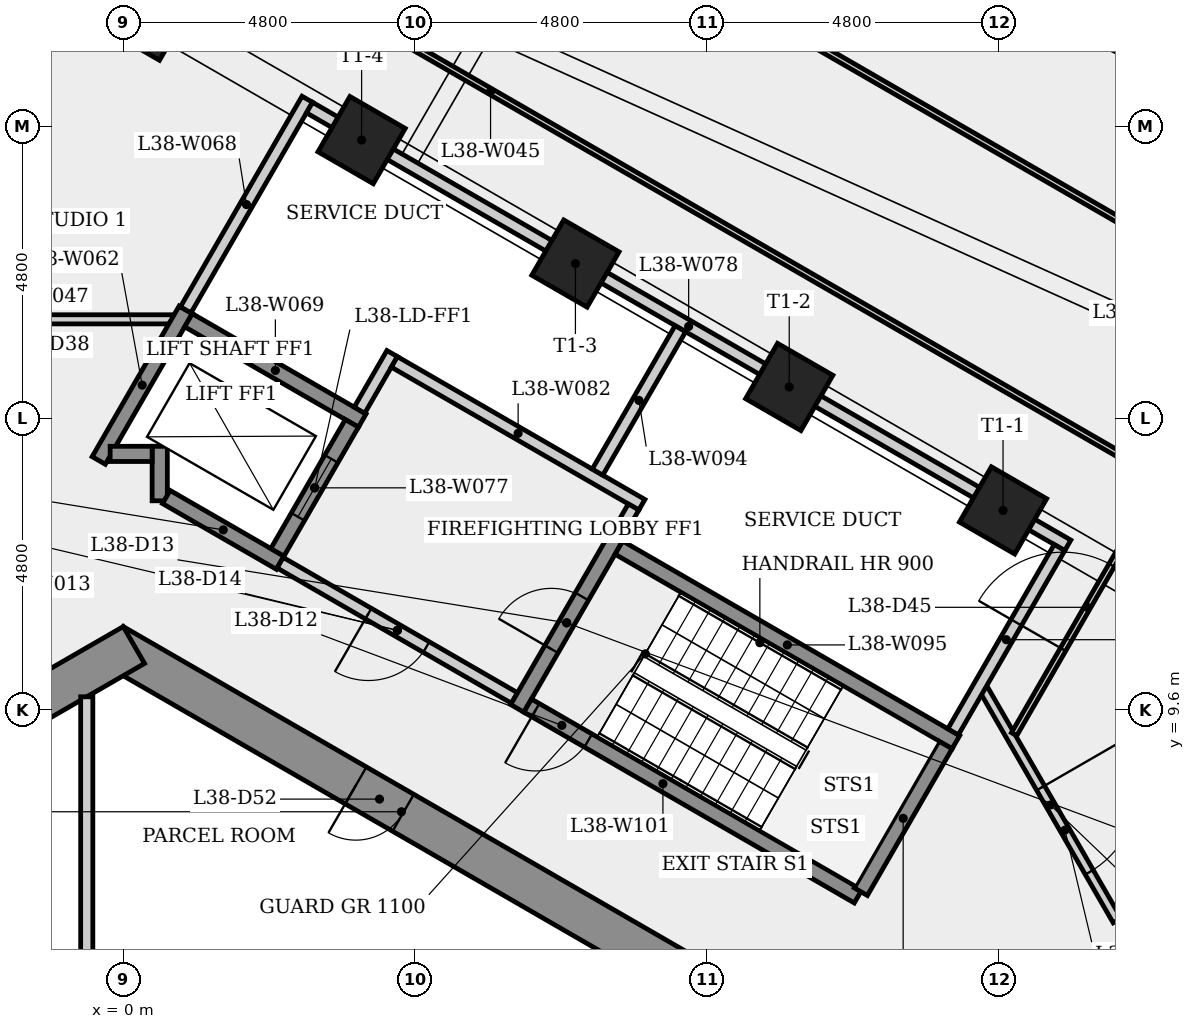
"""IFC4 building model, lengths in metres.
Left out: names, types, materials, properties, quantities, classifications, styles, units other than length and angle.
Written with IfcOpenShell. Run it as: python <this file> out.ifc"""

import sys

from ifc_helpers import new_model, si_unit, direction, frame, frame_2d, origin, origin_2d, place, context, subcontext, project, spatial, rectangle, extrude, element, fill, save


model = new_model("IFC4")
c1 = context("Model", 3, precision=1e-05, world=origin(), true_north=direction((0.0, 1.0)))
c2 = subcontext(c1, "Body", "Model", "MODEL_VIEW")
j1 = project(units=[si_unit("LENGTHUNIT", "METRE"), si_unit("PLANEANGLEUNIT", "RADIAN")], contexts=[c1])
p1 = place(None, origin())
s1 = spatial("IfcSite", under=j1, at=p1, CompositionType="ELEMENT")
p2 = place(p1, origin())
s2 = spatial("IfcBuilding", under=s1, at=p2, CompositionType="ELEMENT")
p3 = place(p2, frame((0.0, 0.0, 143.9)))
s3 = spatial("IfcBuildingStorey", under=s2, at=p3, CompositionType="ELEMENT", Elevation=143.9)
p4 = place(p3, frame((9.325, 5.182, 0.0), z_axis=(0.0, 0.0, 1.0), x_axis=(-0.866023993627, 0.500002442456, 0.0)))
e1 = element("IfcWall", 1, at=p4, inside=s3, PredefinedType="SHEAR", context=c2, shape_type="SweptSolid", body=[
    extrude(rectangle(XDim=10.97, YDim=0.7, at=frame_2d((5.485, 0.0))), origin(), (0.0, 0.0, 1.0), 4.0),
])
p5 = place(p4, frame((5.451, 0.0, 0.0)))
e2 = element("IfcOpeningElement", 2, at=p5, cuts=e1, PredefinedType="OPENING", context=c2, shape_type="SweptSolid", body=[
    extrude(rectangle(XDim=0.9, YDim=2.1, at=frame_2d((0.45, 1.05))), frame((0.0, 0.36, 0.0), z_axis=(0.0, -1.0, 0.0), x_axis=(1.0, 0.0, 0.0)), (0.0, 0.0, 1.0), 0.72),
])
p6 = place(p3, frame((0.175, 10.667, 0.0), z_axis=(0.0, 0.0, 1.0), x_axis=(-0.866023993627, -0.500002442456, 0.0)))
e3 = element("IfcWall", 3, at=p6, inside=s3, PredefinedType="SHEAR", context=c2, shape_type="SweptSolid", body=[
    extrude(rectangle(XDim=10.97, YDim=0.7, at=frame_2d((5.485, 0.0))), origin(), (0.0, 0.0, 1.0), 4.0),
])
p7 = place(p6, frame((7.021, 0.0, 0.0)))
e4 = element("IfcOpeningElement", 4, at=p7, cuts=e3, PredefinedType="OPENING", context=c2, shape_type="SweptSolid", body=[
    extrude(rectangle(XDim=0.9, YDim=2.1, at=frame_2d((0.45, 1.05))), frame((0.0, 0.36, 0.0), z_axis=(0.0, -1.0, 0.0), x_axis=(1.0, 0.0, 0.0)), (0.0, 0.0, 1.0), 0.72),
])
for number, where, z_axis, x_axis in (
    (5, (14.469, 12.88, 0.0), (0.0, 0.0, 1.0), (0.5, 0.866, 0.0)),
    (6, (10.953, 14.911, 0.0), (0.0, 0.0, 1.0), (0.5, 0.866, 0.0)),
    (7, (7.437, 16.941, 0.0), (0.0, 0.0, 1.0), (0.5, 0.866, 0.0)),
    (8, (3.92, 18.971, 0.0), (0.0, 0.0, 1.0), (0.5, 0.866, 0.0)),
    (9, (0.404, 21.001, 0.0), (0.0, 0.0, 1.0), (0.5, 0.866, 0.0)),
):
    element("IfcColumn", number, at=place(p3, frame(where, z_axis=z_axis, x_axis=x_axis)), inside=s3, PredefinedType="COLUMN", context=c2, shape_type="SweptSolid", body=[
        extrude(rectangle(XDim=1.05, YDim=1.05, at=origin_2d()), origin(), (0.0, 0.0, 1.0), 4.0),
    ])
p8 = place(p3, frame((-4.951, 26.117, 0.0), z_axis=(0.0, 0.0, 1.0), x_axis=(0.866023342268, -0.500003570635, 0.0)))
e10 = element("IfcWall", 10, at=p8, inside=s3, PredefinedType="PARTITIONING", context=c2, shape_type="SweptSolid", body=[
    extrude(rectangle(XDim=25.385, YDim=0.1, at=frame_2d((12.692, 0.0))), origin(), (0.0, 0.0, 1.0), 3.6),
])
p9 = place(p3, frame((-3.581, 16.023, 0.0), z_axis=(0.0, 0.0, 1.0), x_axis=(1.0, 0.0, 0.0)))
e11 = element("IfcWall", 11, at=p9, inside=s3, PredefinedType="PARTITIONING", context=c2, shape_type="SweptSolid", body=[
    extrude(rectangle(XDim=4.393, YDim=0.15, at=frame_2d((2.196, 0.0))), origin(), (0.0, 0.0, 1.0), 3.6),
])
for number, where, z_axis, x_axis in (
    (12, (-3.283, 29.005, 0.0), (0.0, 0.0, 1.0), (0.866, -0.5, 0.0)),
    (13, (-1.615, 31.894, 0.0), (0.0, 0.0, 1.0), (0.866, -0.5, 0.0)),
):
    element("IfcWall", number, at=place(p3, frame(where, z_axis=z_axis, x_axis=x_axis)), inside=s3, PredefinedType="PARTITIONING", context=c2, shape_type="SweptSolid", body=[
        extrude(rectangle(XDim=25.385, YDim=0.1, at=frame_2d((12.692, 0.0))), origin(), (0.0, 0.0, 1.0), 3.6),
    ])
p10 = place(p3, frame((-0.6, 9.815, 0.0), z_axis=(0.0, 0.0, 1.0), x_axis=(0.0, -1.0, 0.0)))
e14 = element("IfcWall", 14, at=p10, inside=s3, PredefinedType="PARTITIONING", context=c2, shape_type="SweptSolid", body=[
    extrude(rectangle(XDim=4.54, YDim=0.2, at=frame_2d((2.27, 0.0))), origin(), (0.0, 0.0, 1.0), 3.6),
])
p11 = place(p3, frame((-0.403, 13.702, 0.0), z_axis=(0.0, 0.0, 1.0), x_axis=(0.499976111731, 0.866039195244, 0.0)))
e15 = element("IfcWall", 15, at=p11, inside=s3, PredefinedType="SHEAR", context=c2, shape_type="SweptSolid", body=[
    extrude(rectangle(XDim=2.861, YDim=0.25, at=frame_2d((1.43, 0.0))), origin(), (0.0, 0.0, 1.0), 3.6),
])
p12 = place(p3, frame((0.6, 13.039, 0.0), z_axis=(0.0, 0.0, 1.0), x_axis=(0.0, 1.0, 0.0)))
e16 = element("IfcWall", 16, at=p12, inside=s3, PredefinedType="SHEAR", context=c2, shape_type="SweptSolid", body=[
    extrude(rectangle(XDim=0.896, YDim=0.25, at=frame_2d((0.448, 0.0))), origin(), (0.0, 0.0, 1.0), 3.6),
])
p13 = place(p3, frame((0.475, 13.81, 0.0), z_axis=(0.0, 0.0, 1.0), x_axis=(-1.0, 0.0, 0.0)))
e17 = element("IfcWall", 17, at=p13, inside=s3, PredefinedType="SHEAR", context=c2, shape_type="SweptSolid", body=[
    extrude(rectangle(XDim=0.691, YDim=0.25, at=frame_2d((0.345, 0.0))), origin(), (0.0, 0.0, 1.0), 4.0),
])
p14 = place(p3, frame((1.027, 16.179, 0.0), z_axis=(0.0, 0.0, 1.0), x_axis=(0.500006030964, 0.866021921778, 0.0)))
e18 = element("IfcWall", 18, at=p14, inside=s3, PredefinedType="PLUMBINGWALL", context=c2, shape_type="SweptSolid", body=[
    extrude(rectangle(XDim=4.0, YDim=0.2, at=frame_2d((2.0, 0.0))), origin(), (0.0, 0.0, 1.0), 3.6),
])
p15 = place(p3, frame((1.073, 16.008, 0.0), z_axis=(0.0, 0.0, 1.0), x_axis=(0.866040211805, -0.499974350878, 0.0)))
e19 = element("IfcWall", 19, at=p15, inside=s3, PredefinedType="SHEAR", context=c2, shape_type="SweptSolid", body=[
    extrude(rectangle(XDim=3.3, YDim=0.25, at=frame_2d((1.65, 0.0))), origin(), (0.0, 0.0, 1.0), 3.6),
])
p16 = place(p3, frame((2.581, 12.02, 0.0), z_axis=(0.0, 0.0, 1.0), x_axis=(-0.86603892542, 0.499976579108, 0.0)))
e20 = element("IfcWall", 20, at=p16, inside=s3, PredefinedType="SHEAR", context=c2, shape_type="SweptSolid", body=[
    extrude(rectangle(XDim=2.162, YDim=0.25, at=frame_2d((1.081, 0.0))), origin(), (0.0, 0.0, 1.0), 3.6),
])
p17 = place(p3, frame((2.535, 12.191, 0.0), z_axis=(0.0, 0.0, 1.0), x_axis=(0.500061746146, 0.865989751695, 0.0)))
e21 = element("IfcWall", 21, at=p17, inside=s3, PredefinedType="SHEAR", context=c2, shape_type="SweptSolid", body=[
    extrude(rectangle(XDim=2.45, YDim=0.25, at=frame_2d((1.225, 0.0))), origin(), (0.0, 0.0, 1.0), 4.0),
])
p18 = place(p17, frame((0.675, 0.0, 0.0)))
e22 = element("IfcOpeningElement", 22, at=p18, cuts=e21, PredefinedType="OPENING", context=c2, shape_type="SweptSolid", body=[
    extrude(rectangle(XDim=1.1, YDim=2.1, at=frame_2d((0.55, 1.05))), frame((0.0, 0.135, 0.0), z_axis=(0.0, -1.0, 0.0), x_axis=(1.0, 0.0, 0.0)), (0.0, 0.0, 1.0), 0.27),
])
p19 = place(p3, frame((3.063, 19.506, 0.0), z_axis=(0.0, 0.0, 1.0), x_axis=(0.866025783705, -0.499999341958, 0.0)))
e23 = element("IfcWall", 23, at=p19, inside=s3, PredefinedType="PLUMBINGWALL", context=c2, shape_type="SweptSolid", body=[
    extrude(rectangle(XDim=14.4, YDim=0.2, at=frame_2d((7.2, 0.0))), origin(), (0.0, 0.0, 1.0), 2.725),
])
p20 = place(p3, frame((3.885, 14.529, 0.0), z_axis=(0.0, 0.0, 1.0), x_axis=(0.499997628298, 0.866026773083, 0.0)))
e24 = element("IfcWall", 24, at=p20, inside=s3, PredefinedType="PLUMBINGWALL", context=c2, shape_type="SweptSolid", body=[
    extrude(rectangle(XDim=1.075, YDim=0.2, at=frame_2d((0.538, 0.0))), origin(), (0.0, 0.0, 1.0), 3.6),
])
p21 = place(p3, frame((4.459, 15.323, 0.0), z_axis=(0.0, 0.0, 1.0), x_axis=(0.866016039709, -0.500016218704, 0.0)))
e25 = element("IfcWall", 25, at=p21, inside=s3, PredefinedType="PLUMBINGWALL", context=c2, shape_type="SweptSolid", body=[
    extrude(rectangle(XDim=4.7, YDim=0.2, at=frame_2d((2.35, 0.0))), origin(), (0.0, 0.0, 1.0), 3.6),
])
p22 = place(p3, frame((6.435, 9.795, 0.0), z_axis=(0.0, 0.0, 1.0), x_axis=(-0.866012907634, 0.500021643343, 0.0)))
e26 = element("IfcWall", 26, at=p22, inside=s3, PredefinedType="PARTITIONING", context=c2, shape_type="SweptSolid", body=[
    extrude(rectangle(XDim=4.45, YDim=0.2, at=frame_2d((2.225, 0.0))), origin(), (0.0, 0.0, 1.0), 3.6),
])
p23 = place(p22, frame((1.675, 0.0, 0.0)))
e27 = element("IfcOpeningElement", 27, at=p23, cuts=e26, PredefinedType="OPENING", context=c2, shape_type="SweptSolid", body=[
    extrude(rectangle(XDim=1.1, YDim=2.1, at=frame_2d((0.55, 1.05))), frame((0.0, 0.11, 0.0), z_axis=(0.0, -1.0, 0.0), x_axis=(1.0, 0.0, 0.0)), (0.0, 0.0, 1.0), 0.22),
])
p24 = place(p3, frame((6.48, 9.624, 0.0), z_axis=(0.0, 0.0, 1.0), x_axis=(0.500017246033, 0.866015446554, 0.0)))
e28 = element("IfcWall", 28, at=p24, inside=s3, PredefinedType="SHEAR", context=c2, shape_type="SweptSolid", body=[
    extrude(rectangle(XDim=3.25, YDim=0.25, at=frame_2d((1.625, 0.0))), origin(), (0.0, 0.0, 1.0), 3.6),
])
p25 = place(p24, frame((1.125, 0.0, 0.0)))
e29 = element("IfcOpeningElement", 29, at=p25, cuts=e28, PredefinedType="OPENING", context=c2, shape_type="SweptSolid", body=[
    extrude(rectangle(XDim=1.0, YDim=2.1, at=frame_2d((0.5, 1.05))), frame((0.0, 0.135, 0.0), z_axis=(0.0, -1.0, 0.0), x_axis=(1.0, 0.0, 0.0)), (0.0, 0.0, 1.0), 0.27),
])
p26 = place(p3, frame((7.8, 13.51, 0.0), z_axis=(0.0, 0.0, 1.0), x_axis=(0.499965519898, 0.866045309965, 0.0)))
e30 = element("IfcWall", 30, at=p26, inside=s3, PredefinedType="PLUMBINGWALL", context=c2, shape_type="SweptSolid", body=[
    extrude(rectangle(XDim=2.724, YDim=0.2, at=frame_2d((1.362, 0.0))), origin(), (0.0, 0.0, 1.0), 3.6),
])
p27 = place(p3, frame((8.151, 12.268, 0.0), z_axis=(0.0, 0.0, 1.0), x_axis=(0.866025499775, -0.499999833739, 0.0)))
e31 = element("IfcWall", 31, at=p27, inside=s3, PredefinedType="SHEAR", context=c2, shape_type="SweptSolid", body=[
    extrude(rectangle(XDim=6.4, YDim=0.25, at=frame_2d((3.2, 0.0))), origin(), (0.0, 0.0, 1.0), 3.6),
])
p28 = place(p3, frame((8.393, 12.937, 0.0), z_axis=(0.0, 0.0, 1.0), x_axis=(-0.500065409566, -0.86598763626, 0.0)))
e32 = element("IfcWall", 32, at=p28, inside=s3, PredefinedType="PLUMBINGWALL", context=c2, shape_type="SweptSolid", body=[
    extrude(rectangle(XDim=0.575, YDim=0.2, at=frame_2d((0.288, 0.0))), origin(), (0.0, 0.0, 1.0), 3.6),
])
p29 = place(p3, frame((11.1, 7.101, 0.0), z_axis=(0.0, 0.0, 1.0), x_axis=(-0.8660265141, 0.499998076872, 0.0)))
e33 = element("IfcWall", 33, at=p29, inside=s3, PredefinedType="SHEAR", context=c2, shape_type="SweptSolid", body=[
    extrude(rectangle(XDim=5.137, YDim=0.25, at=frame_2d((2.569, 0.0))), origin(), (0.0, 0.0, 1.0), 3.6),
])
p30 = place(p29, frame((3.987, 0.0, 0.0)))
e34 = element("IfcOpeningElement", 34, at=p30, cuts=e33, PredefinedType="OPENING", context=c2, shape_type="SweptSolid", body=[
    extrude(rectangle(XDim=1.0, YDim=2.1, at=frame_2d((0.5, 1.05))), frame((0.0, 0.135, 0.0), z_axis=(0.0, -1.0, 0.0), x_axis=(1.0, 0.0, 0.0)), (0.0, 0.0, 1.0), 0.27),
])
p31 = place(p3, frame((12.085, 6.532, 0.0), z_axis=(0.0, 0.0, 1.0), x_axis=(-0.86604373436, 0.499968249168, 0.0)))
e35 = element("IfcWall", 35, at=p31, inside=s3, PredefinedType="SHEAR", context=c2, shape_type="SweptSolid", body=[
    extrude(rectangle(XDim=1.118, YDim=0.25, at=frame_2d((0.559, 0.0))), origin(), (0.0, 0.0, 1.0), 3.6),
])
p32 = place(p3, frame((13.523, 9.022, 0.0), z_axis=(0.0, 0.0, 1.0), x_axis=(-0.500013277472, -0.866017737897, 0.0)))
e36 = element("IfcWall", 36, at=p32, inside=s3, PredefinedType="SHEAR", context=c2, shape_type="SweptSolid", body=[
    extrude(rectangle(XDim=2.786, YDim=0.25, at=frame_2d((1.393, 0.0))), origin(), (0.0, 0.0, 1.0), 3.6),
])
p33 = place(p3, frame((14.151, 9.937, 0.0), z_axis=(0.0, 0.0, 1.0), x_axis=(0.500038547485, -0.86600314724, 0.0)))
e37 = element("IfcWall", 37, at=p33, inside=s3, PredefinedType="PARTITIONING", context=c2, shape_type="SweptSolid", body=[
    extrude(rectangle(XDim=4.39, YDim=0.15, at=frame_2d((2.195, 0.0))), origin(), (0.0, 0.0, 1.0), 3.6),
])
p34 = place(p33, frame((1.873, 0.0, 0.0)))
e38 = element("IfcOpeningElement", 38, at=p34, cuts=e37, PredefinedType="OPENING", context=c2, shape_type="SweptSolid", body=[
    extrude(rectangle(XDim=1.6, YDim=2.1, at=frame_2d((0.8, 1.05))), frame((0.0, 0.085, 0.0), z_axis=(0.0, -1.0, 0.0), x_axis=(1.0, 0.0, 0.0)), (0.0, 0.0, 1.0), 0.17),
])
p35 = place(p3, frame((13.648, 9.239, 0.0), z_axis=(0.0, 0.0, 1.0), x_axis=(0.49996604514, 0.866045006744, 0.0)))
e39 = element("IfcWall", 39, at=p35, inside=s3, PredefinedType="PLUMBINGWALL", context=c2, shape_type="SweptSolid", body=[
    extrude(rectangle(XDim=3.499, YDim=0.2, at=frame_2d((1.75, 0.0))), origin(), (0.0, 0.0, 1.0), 3.6),
])
p36 = place(p3, frame((14.651, 9.2, 0.0), z_axis=(0.0, 0.0, 1.0), x_axis=(0.500009799479, 0.866019745978, 0.0)))
e40 = element("IfcWall", 40, at=p36, inside=s3, PredefinedType="PARTITIONING", context=c2, shape_type="SweptSolid", body=[
    extrude(rectangle(XDim=19.367, YDim=0.1, at=frame_2d((9.684, 0.0))), origin(), (0.0, 0.0, 1.0), 3.6),
])
p37 = place(p36, frame((16.036, 0.0, 0.0)))
e41 = element("IfcOpeningElement", 41, at=p37, cuts=e40, PredefinedType="OPENING", context=c2, shape_type="SweptSolid", body=[
    extrude(rectangle(XDim=1.6, YDim=2.1, at=frame_2d((0.8, 1.05))), frame((0.0, 0.06, 0.0), z_axis=(0.0, -1.0, 0.0), x_axis=(1.0, 0.0, 0.0)), (0.0, 0.0, 1.0), 0.12),
])
p38 = place(p36, frame((1.61, 0.0, 0.0)))
e42 = element("IfcOpeningElement", 42, at=p38, cuts=e40, PredefinedType="OPENING", context=c2, shape_type="SweptSolid", body=[
    extrude(rectangle(XDim=1.6, YDim=2.1, at=frame_2d((0.8, 1.05))), frame((0.0, 0.06, 0.0), z_axis=(0.0, -1.0, 0.0), x_axis=(1.0, 0.0, 0.0)), (0.0, 0.0, 1.0), 0.12),
])
p39 = place(p36, frame((6.067, 0.0, 0.0)))
e43 = element("IfcOpeningElement", 43, at=p39, cuts=e40, PredefinedType="OPENING", context=c2, shape_type="SweptSolid", body=[
    extrude(rectangle(XDim=0.9, YDim=2.1, at=frame_2d((0.45, 1.05))), frame((0.0, 0.06, 0.0), z_axis=(0.0, -1.0, 0.0), x_axis=(1.0, 0.0, 0.0)), (0.0, 0.0, 1.0), 0.12),
])
p40 = place(p36, frame((9.053, 0.0, 0.0)))
e44 = element("IfcOpeningElement", 44, at=p40, cuts=e40, PredefinedType="OPENING", context=c2, shape_type="SweptSolid", body=[
    extrude(rectangle(XDim=1.6, YDim=2.1, at=frame_2d((0.8, 1.05))), frame((0.0, 0.06, 0.0), z_axis=(0.0, -1.0, 0.0), x_axis=(1.0, 0.0, 0.0)), (0.0, 0.0, 1.0), 0.12),
])
p41 = place(p30, origin())
e45 = element("IfcDoor", 45, at=p41, inside=s3, OperationType="SINGLE_SWING_RIGHT", PredefinedType="DOOR", context=c2, shape_type="SweptSolid", body=[
    extrude(rectangle(XDim=1.0, YDim=2.1, at=frame_2d((0.5, 1.05))), frame((0.0, 0.025, 0.0), z_axis=(0.0, -1.0, 0.0), x_axis=(1.0, 0.0, 0.0)), (0.0, 0.0, 1.0), 0.05),
])
fill(e34, e45)
p42 = place(p25, origin())
e46 = element("IfcDoor", 46, at=p42, inside=s3, OperationType="SINGLE_SWING_LEFT", PredefinedType="DOOR", context=c2, shape_type="SweptSolid", body=[
    extrude(rectangle(XDim=1.0, YDim=2.1, at=frame_2d((0.5, 1.05))), frame((0.0, 0.025, 0.0), z_axis=(0.0, -1.0, 0.0), x_axis=(1.0, 0.0, 0.0)), (0.0, 0.0, 1.0), 0.05),
])
fill(e29, e46)
p43 = place(p23, origin())
e47 = element("IfcDoor", 47, at=p43, inside=s3, OperationType="SINGLE_SWING_RIGHT", PredefinedType="DOOR", context=c2, shape_type="SweptSolid", body=[
    extrude(rectangle(XDim=1.1, YDim=2.1, at=frame_2d((0.55, 1.05))), frame((0.0, 0.025, 0.0), z_axis=(0.0, -1.0, 0.0), x_axis=(1.0, 0.0, 0.0)), (0.0, 0.0, 1.0), 0.05),
])
fill(e27, e47)
p44 = place(p18, origin())
e48 = element("IfcDoor", 48, at=p44, inside=s3, OperationType="SLIDING_TO_LEFT", PredefinedType="DOOR", context=c2, shape_type="SweptSolid", body=[
    extrude(rectangle(XDim=1.1, YDim=2.1, at=frame_2d((0.55, 1.05))), frame((0.0, 0.025, 0.0), z_axis=(0.0, -1.0, 0.0), x_axis=(1.0, 0.0, 0.0)), (0.0, 0.0, 1.0), 0.05),
])
fill(e22, e48)
p45 = place(p34, origin())
e49 = element("IfcDoor", 49, at=p45, inside=s3, OperationType="SINGLE_SWING_LEFT", PredefinedType="DOOR", context=c2, shape_type="SweptSolid", body=[
    extrude(rectangle(XDim=1.6, YDim=2.1, at=frame_2d((0.8, 1.05))), frame((0.0, 0.025, 0.0), z_axis=(0.0, -1.0, 0.0), x_axis=(1.0, 0.0, 0.0)), (0.0, 0.0, 1.0), 0.05),
])
fill(e38, e49)
p46 = place(p38, origin())
e50 = element("IfcDoor", 50, at=p46, inside=s3, OperationType="SINGLE_SWING_LEFT", PredefinedType="DOOR", context=c2, shape_type="SweptSolid", body=[
    extrude(rectangle(XDim=1.6, YDim=2.1, at=frame_2d((0.8, 1.05))), frame((0.0, 0.025, 0.0), z_axis=(0.0, -1.0, 0.0), x_axis=(1.0, 0.0, 0.0)), (0.0, 0.0, 1.0), 0.05),
])
fill(e42, e50)
p47 = place(p5, origin())
e51 = element("IfcDoor", 51, at=p47, inside=s3, OperationType="SINGLE_SWING_RIGHT", PredefinedType="DOOR", context=c2, shape_type="SweptSolid", body=[
    extrude(rectangle(XDim=0.9, YDim=2.1, at=frame_2d((0.45, 1.05))), frame((0.0, 0.025, 0.0), z_axis=(0.0, -1.0, 0.0), x_axis=(1.0, 0.0, 0.0)), (0.0, 0.0, 1.0), 0.05),
])
fill(e2, e51)
save(model, sys.argv[1])
